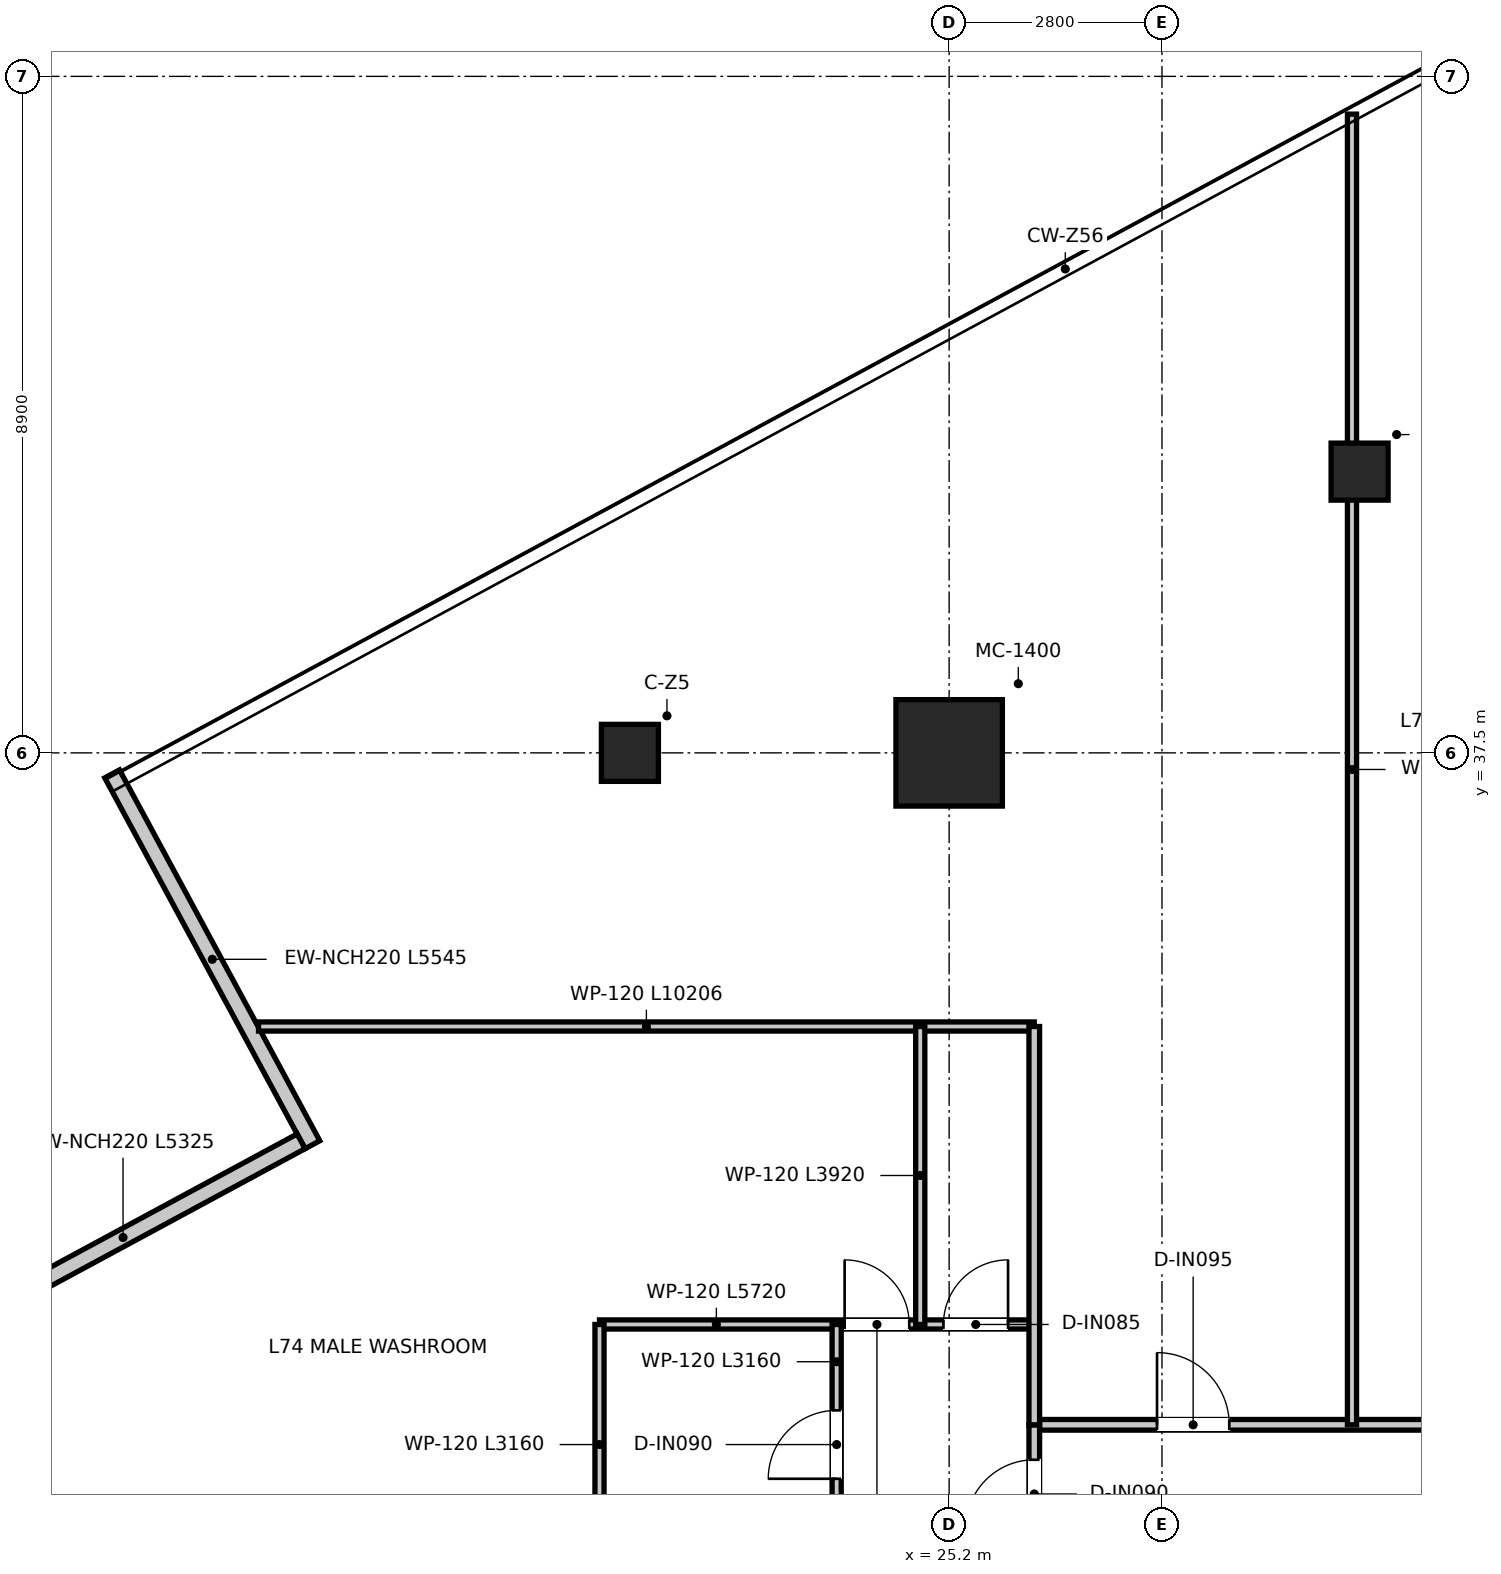
"""IFC4 building model, lengths in metres.
Left out: names, types, materials, properties, quantities, classifications, styles, units other than length and angle.
Written with IfcOpenShell. Run it as: python <this file> out.ifc"""

import sys

from ifc_helpers import new_model, si_unit, direction, frame, frame_2d, origin, origin_2d, place, context, subcontext, project, spatial, rectangle, extrude, source, transform, mapped, element, fill, save


model = new_model("IFC4")
c1 = context("Model", 3, precision=1e-05, world=origin(), true_north=direction((0.0, 1.0)))
c2 = subcontext(c1, "Body", "Model", "MODEL_VIEW")
j1 = project(units=[si_unit("LENGTHUNIT", "METRE"), si_unit("PLANEANGLEUNIT", "RADIAN")], contexts=[c1])
p1 = place(None, origin())
s1 = spatial("IfcSite", under=j1, at=p1, CompositionType="ELEMENT")
p2 = place(p1, origin())
s2 = spatial("IfcBuilding", under=s1, at=p2, CompositionType="ELEMENT")
p3 = place(p2, frame((0.0, 0.0, 302.95)))
s3 = spatial("IfcBuildingStorey", under=s2, at=p3, CompositionType="ELEMENT", Elevation=302.95)
m1 = source(origin(), c2, "Body", "SweptSolid", [
    extrude(rectangle(XDim=1.4, YDim=1.4, at=origin_2d()), origin(), (0.0, 0.0, 1.0), 3.95),
])
p4 = place(p3, frame((25.2, 37.5, 0.0), z_axis=(0.0, 0.0, 1.0), x_axis=(1.0, 0.0, 0.0)))
e1 = element("IfcColumn", 1, at=p4, inside=s3, PredefinedType="USERDEFINED", context=c2, shape_type="MappedRepresentation", body=[
    mapped(m1, transform((0.0, 0.0, 0.0), x_axis=(1.0, 0.0, 0.0), y_axis=(0.0, 1.0, 0.0), z_axis=(0.0, 0.0, 1.0), scale=1.0)),
])
m2 = source(origin(), c2, "Body", "SweptSolid", [
    extrude(rectangle(XDim=0.75, YDim=0.75, at=origin_2d()), origin(), (0.0, 0.0, 1.0), 3.95),
])
for number, where, z_axis, x_axis in (
    (2, (21.0, 37.5, 0.0), (0.0, 0.0, 1.0), (1.0, 0.0, 0.0)),
    (3, (30.6, 41.2, 0.0), (0.0, 0.0, 1.0), (1.0, 0.0, 0.0)),
):
    element("IfcColumn", number, at=place(p3, frame(where, z_axis=z_axis, x_axis=x_axis)), inside=s3, PredefinedType="COLUMN", context=c2, shape_type="MappedRepresentation", body=[
        mapped(m2, transform((0.0, 0.0, 0.0), x_axis=(1.0, 0.0, 0.0), y_axis=(0.0, 1.0, 0.0), z_axis=(0.0, 0.0, 1.0), scale=1.0)),
    ])
p5 = place(p3, frame((14.188, 37.223, 0.0), z_axis=(0.0, 0.0, 1.0), x_axis=(0.475257315172, -0.879846852796, 0.0)))
e4 = element("IfcWall", 4, at=p5, inside=s3, PredefinedType="ELEMENTEDWALL", context=c2, shape_type="SweptSolid", body=[
    extrude(rectangle(XDim=5.545, YDim=0.22, at=frame_2d((2.772, 0.0))), origin(), (0.0, 0.0, 1.0), 3.67),
])
p6 = place(p3, frame((16.674, 32.389, 0.0), z_axis=(0.0, 0.0, 1.0), x_axis=(-0.879859387449, -0.475234108958, 0.0)))
e5 = element("IfcWall", 5, at=p6, inside=s3, PredefinedType="ELEMENTEDWALL", context=c2, shape_type="SweptSolid", body=[
    extrude(rectangle(XDim=5.325, YDim=0.22, at=frame_2d((2.662, 0.0))), origin(), (0.0, 0.0, 1.0), 3.67),
])
p7 = place(p3, frame((26.32, 28.66, 0.0), z_axis=(0.0, 0.0, 1.0), x_axis=(1.0, 0.0, 0.0)))
e6 = element("IfcWall", 6, at=p7, inside=s3, PredefinedType="PARTITIONING", context=c2, shape_type="SweptSolid", body=[
    extrude(rectangle(XDim=19.36, YDim=0.14, at=frame_2d((9.68, 0.0))), origin(), (0.0, 0.0, 1.0), 3.18),
])
p8 = place(p7, frame((1.615, 0.0, 0.0)))
e7 = element("IfcOpeningElement", 7, at=p8, cuts=e6, PredefinedType="OPENING", context=c2, shape_type="SweptSolid", body=[
    extrude(rectangle(XDim=0.95, YDim=2.1, at=frame_2d((0.475, 1.05))), frame((0.0, 0.08, 0.0), z_axis=(0.0, -1.0, 0.0), x_axis=(1.0, 0.0, 0.0)), (0.0, 0.0, 1.0), 0.16),
])
p9 = place(p7, frame((6.455, 0.0, 0.0)))
e8 = element("IfcOpeningElement", 8, at=p9, cuts=e6, PredefinedType="OPENING", context=c2, shape_type="SweptSolid", body=[
    extrude(rectangle(XDim=0.95, YDim=2.1, at=frame_2d((0.475, 1.05))), frame((0.0, 0.08, 0.0), z_axis=(0.0, -1.0, 0.0), x_axis=(1.0, 0.0, 0.0)), (0.0, 0.0, 1.0), 0.16),
])
p10 = place(p7, frame((11.955, 0.0, 0.0)))
e9 = element("IfcOpeningElement", 9, at=p10, cuts=e6, PredefinedType="OPENING", context=c2, shape_type="SweptSolid", body=[
    extrude(rectangle(XDim=0.95, YDim=2.1, at=frame_2d((0.475, 1.05))), frame((0.0, 0.08, 0.0), z_axis=(0.0, -1.0, 0.0), x_axis=(1.0, 0.0, 0.0)), (0.0, 0.0, 1.0), 0.16),
])
p11 = place(p7, frame((16.795, 0.0, 0.0)))
e10 = element("IfcOpeningElement", 10, at=p11, cuts=e6, PredefinedType="OPENING", context=c2, shape_type="SweptSolid", body=[
    extrude(rectangle(XDim=0.95, YDim=2.1, at=frame_2d((0.475, 1.05))), frame((0.0, 0.08, 0.0), z_axis=(0.0, -1.0, 0.0), x_axis=(1.0, 0.0, 0.0)), (0.0, 0.0, 1.0), 0.16),
])
p12 = place(p3, frame((26.32, 9.0, 0.0), z_axis=(0.0, 0.0, 1.0), x_axis=(0.0, 1.0, 0.0)))
e11 = element("IfcWall", 11, at=p12, inside=s3, PredefinedType="PARTITIONING", context=c2, shape_type="SweptSolid", body=[
    extrude(rectangle(XDim=19.66, YDim=0.14, at=frame_2d((9.83, 0.0))), origin(), (0.0, 0.0, 1.0), 3.13),
])
p13 = place(p12, frame((18.3, 0.0, 0.0)))
e12 = element("IfcOpeningElement", 12, at=p13, cuts=e11, PredefinedType="OPENING", context=c2, shape_type="SweptSolid", body=[
    extrude(rectangle(XDim=0.9, YDim=2.1, at=frame_2d((0.45, 1.05))), frame((0.0, 0.08, 0.0), z_axis=(0.0, -1.0, 0.0), x_axis=(1.0, 0.0, 0.0)), (0.0, 0.0, 1.0), 0.16),
])
p14 = place(p12, frame((1.95, 0.0, 0.0)))
e13 = element("IfcOpeningElement", 13, at=p14, cuts=e11, PredefinedType="OPENING", context=c2, shape_type="SweptSolid", body=[
    extrude(rectangle(XDim=0.9, YDim=2.1, at=frame_2d((0.45, 1.05))), frame((0.0, 0.08, 0.0), z_axis=(0.0, -1.0, 0.0), x_axis=(1.0, 0.0, 0.0)), (0.0, 0.0, 1.0), 0.16),
])
p15 = place(p12, frame((10.3, 0.0, 0.0)))
e14 = element("IfcOpeningElement", 14, at=p15, cuts=e11, PredefinedType="OPENING", context=c2, shape_type="SweptSolid", body=[
    extrude(rectangle(XDim=0.9, YDim=2.1, at=frame_2d((0.45, 1.05))), frame((0.0, 0.08, 0.0), z_axis=(0.0, -1.0, 0.0), x_axis=(1.0, 0.0, 0.0)), (0.0, 0.0, 1.0), 0.16),
])
p16 = place(p12, frame((14.96, 0.0, 0.0)))
e15 = element("IfcOpeningElement", 15, at=p16, cuts=e11, PredefinedType="OPENING", context=c2, shape_type="SweptSolid", body=[
    extrude(rectangle(XDim=0.9, YDim=2.1, at=frame_2d((0.45, 1.05))), frame((0.0, 0.08, 0.0), z_axis=(0.0, -1.0, 0.0), x_axis=(1.0, 0.0, 0.0)), (0.0, 0.0, 1.0), 0.16),
])
p17 = place(p3, frame((16.114, 33.9, 0.0), z_axis=(0.0, 0.0, 1.0), x_axis=(1.0, 0.0, 0.0)))
e16 = element("IfcWall", 16, at=p17, inside=s3, PredefinedType="PARTITIONING", context=c2, shape_type="SweptSolid", body=[
    extrude(rectangle(XDim=10.206, YDim=0.12, at=frame_2d((5.103, 0.0))), origin(), (0.0, 0.0, 1.0), 3.13),
])
p18 = place(p3, frame((20.6, 29.98, 0.0), z_axis=(0.0, 0.0, 1.0), x_axis=(1.0, 0.0, 0.0)))
e17 = element("IfcWall", 17, at=p18, inside=s3, PredefinedType="PARTITIONING", context=c2, shape_type="SweptSolid", body=[
    extrude(rectangle(XDim=5.72, YDim=0.12, at=frame_2d((2.86, 0.0))), origin(), (0.0, 0.0, 1.0), 3.13),
])
p19 = place(p18, frame((3.225, 0.0, 0.0)))
e18 = element("IfcOpeningElement", 18, at=p19, cuts=e17, PredefinedType="OPENING", context=c2, shape_type="SweptSolid", body=[
    extrude(rectangle(XDim=0.85, YDim=2.1, at=frame_2d((0.425, 1.05))), frame((0.0, 0.07, 0.0), z_axis=(0.0, -1.0, 0.0), x_axis=(1.0, 0.0, 0.0)), (0.0, 0.0, 1.0), 0.14),
])
p20 = place(p18, frame((4.525, 0.0, 0.0)))
e19 = element("IfcOpeningElement", 19, at=p20, cuts=e17, PredefinedType="OPENING", context=c2, shape_type="SweptSolid", body=[
    extrude(rectangle(XDim=0.85, YDim=2.1, at=frame_2d((0.425, 1.05))), frame((0.0, 0.07, 0.0), z_axis=(0.0, -1.0, 0.0), x_axis=(1.0, 0.0, 0.0)), (0.0, 0.0, 1.0), 0.14),
])
p21 = place(p3, frame((20.6, 26.82, 0.0), z_axis=(0.0, 0.0, 1.0), x_axis=(0.0, 1.0, 0.0)))
e20 = element("IfcWall", 20, at=p21, inside=s3, PredefinedType="PARTITIONING", context=c2, shape_type="SweptSolid", body=[
    extrude(rectangle(XDim=3.16, YDim=0.12, at=frame_2d((1.58, 0.0))), origin(), (0.0, 0.0, 1.0), 3.67),
])
p22 = place(p3, frame((23.72, 26.82, 0.0), z_axis=(0.0, 0.0, 1.0), x_axis=(0.0, 1.0, 0.0)))
e21 = element("IfcWall", 21, at=p22, inside=s3, PredefinedType="PARTITIONING", context=c2, shape_type="SweptSolid", body=[
    extrude(rectangle(XDim=3.16, YDim=0.12, at=frame_2d((1.58, 0.0))), origin(), (0.0, 0.0, 1.0), 3.18),
])
p23 = place(p22, frame((1.13, 0.0, 0.0)))
e22 = element("IfcOpeningElement", 22, at=p23, cuts=e21, PredefinedType="OPENING", context=c2, shape_type="SweptSolid", body=[
    extrude(rectangle(XDim=0.9, YDim=2.1, at=frame_2d((0.45, 1.05))), frame((0.0, 0.07, 0.0), z_axis=(0.0, -1.0, 0.0), x_axis=(1.0, 0.0, 0.0)), (0.0, 0.0, 1.0), 0.14),
])
p24 = place(p3, frame((24.82, 29.98, 0.0), z_axis=(0.0, 0.0, 1.0), x_axis=(0.0, 1.0, 0.0)))
e23 = element("IfcWall", 23, at=p24, inside=s3, PredefinedType="PARTITIONING", context=c2, shape_type="SweptSolid", body=[
    extrude(rectangle(XDim=3.92, YDim=0.12, at=frame_2d((1.96, 0.0))), origin(), (0.0, 0.0, 1.0), 3.31),
])
p25 = place(p3, frame((26.32, 28.66, 0.0), z_axis=(0.0, 0.0, 1.0), x_axis=(0.0, 1.0, 0.0)))
e24 = element("IfcWall", 24, at=p25, inside=s3, PredefinedType="PARTITIONING", context=c2, shape_type="SweptSolid", body=[
    extrude(rectangle(XDim=5.24, YDim=0.14, at=frame_2d((2.62, 0.0))), origin(), (0.0, 0.0, 1.0), 3.43),
])
p26 = place(p3, frame((30.5, 28.66, 0.0), z_axis=(0.0, 0.0, 1.0), x_axis=(0.0, 1.0, 0.0)))
e25 = element("IfcWall", 25, at=p26, inside=s3, PredefinedType="PARTITIONING", context=c2, shape_type="SweptSolid", body=[
    extrude(rectangle(XDim=17.243, YDim=0.12, at=frame_2d((8.622, 0.0))), origin(), (0.0, 0.0, 1.0), 3.13),
])
p27 = place(p13, origin())
e26 = element("IfcDoor", 26, at=p27, inside=s3, OperationType="SINGLE_SWING_LEFT", PredefinedType="DOOR", context=c2, shape_type="SweptSolid", body=[
    extrude(rectangle(XDim=0.9, YDim=2.1, at=frame_2d((0.45, 1.05))), frame((0.0, 0.025, 0.0), z_axis=(0.0, -1.0, 0.0), x_axis=(1.0, 0.0, 0.0)), (0.0, 0.0, 1.0), 0.05),
])
fill(e12, e26)
p28 = place(p19, origin())
e27 = element("IfcDoor", 27, at=p28, inside=s3, OperationType="SINGLE_SWING_LEFT", PredefinedType="DOOR", context=c2, shape_type="SweptSolid", body=[
    extrude(rectangle(XDim=0.85, YDim=2.1, at=frame_2d((0.425, 1.05))), frame((0.0, 0.025, 0.0), z_axis=(0.0, -1.0, 0.0), x_axis=(1.0, 0.0, 0.0)), (0.0, 0.0, 1.0), 0.05),
])
fill(e18, e27)
p29 = place(p20, origin())
e28 = element("IfcDoor", 28, at=p29, inside=s3, OperationType="SINGLE_SWING_RIGHT", PredefinedType="DOOR", context=c2, shape_type="SweptSolid", body=[
    extrude(rectangle(XDim=0.85, YDim=2.1, at=frame_2d((0.425, 1.05))), frame((0.0, 0.025, 0.0), z_axis=(0.0, -1.0, 0.0), x_axis=(1.0, 0.0, 0.0)), (0.0, 0.0, 1.0), 0.05),
])
fill(e19, e28)
p30 = place(p23, origin())
e29 = element("IfcDoor", 29, at=p30, inside=s3, OperationType="SINGLE_SWING_LEFT", PredefinedType="DOOR", context=c2, shape_type="SweptSolid", body=[
    extrude(rectangle(XDim=0.9, YDim=2.1, at=frame_2d((0.45, 1.05))), frame((0.0, 0.025, 0.0), z_axis=(0.0, -1.0, 0.0), x_axis=(1.0, 0.0, 0.0)), (0.0, 0.0, 1.0), 0.05),
])
fill(e22, e29)
p31 = place(p8, origin())
e30 = element("IfcDoor", 30, at=p31, inside=s3, OperationType="SINGLE_SWING_LEFT", PredefinedType="DOOR", context=c2, shape_type="SweptSolid", body=[
    extrude(rectangle(XDim=0.95, YDim=2.1, at=frame_2d((0.475, 1.05))), frame((0.0, 0.025, 0.0), z_axis=(0.0, -1.0, 0.0), x_axis=(1.0, 0.0, 0.0)), (0.0, 0.0, 1.0), 0.05),
])
fill(e7, e30)
save(model, sys.argv[1])
